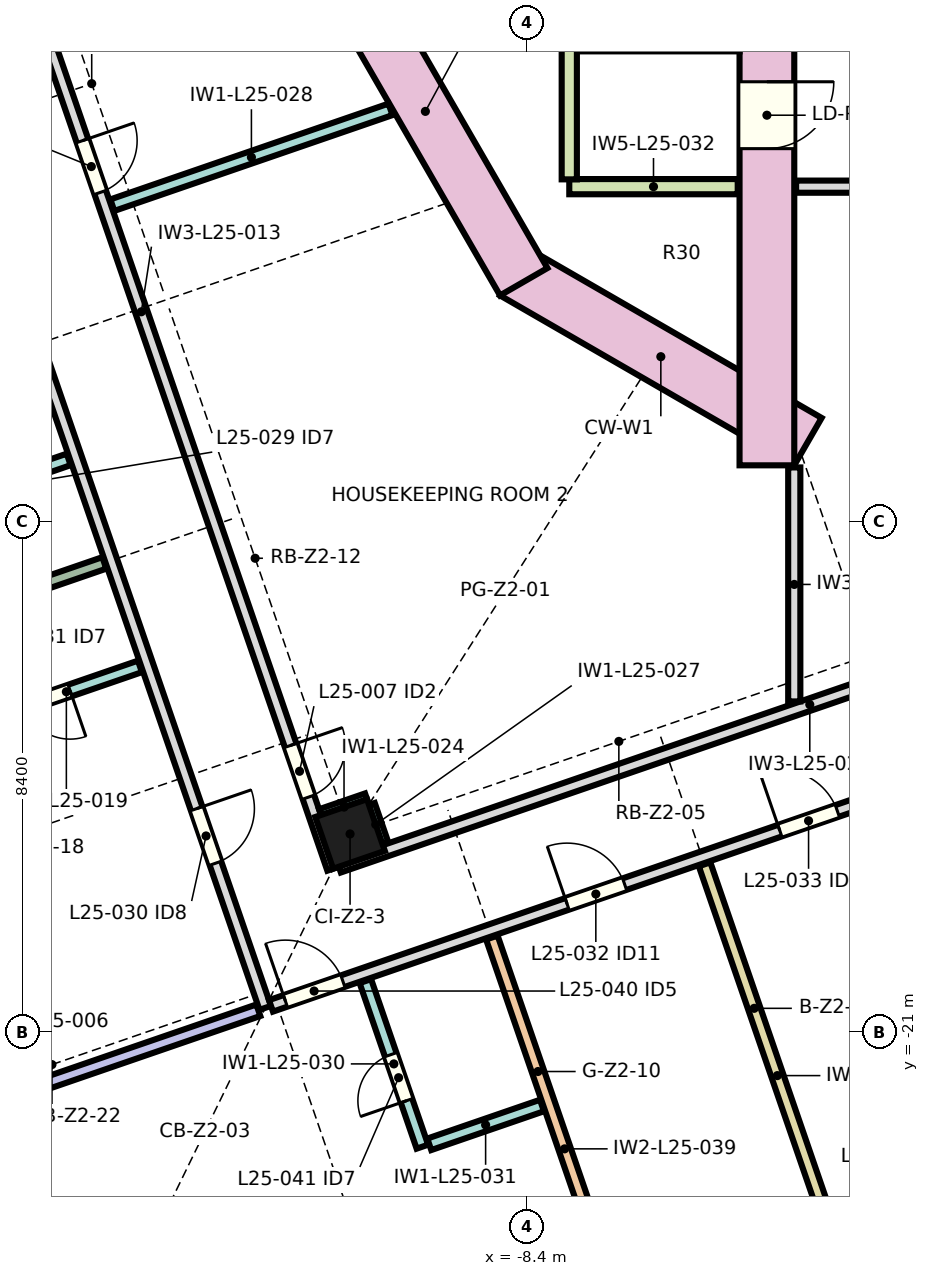
"""IFC4 building model, lengths in metres.
Left out: names, types, materials, properties, quantities, classifications, styles, units other than length and angle.
Written with IfcOpenShell. Run it as: python <this file> out.ifc"""

import sys

from ifc_helpers import new_model, si_unit, direction, frame, frame_2d, origin, origin_2d, place, context, subcontext, project, spatial, rectangle, extrude, element, fill, save


model = new_model("IFC4")
c1 = context("Model", 3, precision=1e-05, world=origin(), true_north=direction((0.0, 1.0)))
c2 = subcontext(c1, "Body", "Model", "MODEL_VIEW")
j1 = project(units=[si_unit("LENGTHUNIT", "METRE"), si_unit("PLANEANGLEUNIT", "RADIAN")], contexts=[c1])
p1 = place(None, origin())
s1 = spatial("IfcSite", under=j1, at=p1, CompositionType="ELEMENT")
p2 = place(p1, origin())
s2 = spatial("IfcBuilding", under=s1, at=p2, CompositionType="ELEMENT")
p3 = place(p2, frame((0.0, 0.0, 123.1)))
s3 = spatial("IfcBuildingStorey", under=s2, at=p3, CompositionType="ELEMENT", Elevation=123.1)
p4 = place(p3, frame((-11.305, -17.695, 0.0), z_axis=(0.0, 0.0, 1.0), x_axis=(0.945518575599, 0.325568154457, 0.0)))
e1 = element("IfcColumn", 1, at=p4, inside=s3, PredefinedType="COLUMN", context=c2, shape_type="SweptSolid", body=[
    extrude(rectangle(XDim=0.9, YDim=0.9, at=origin_2d()), origin(), (0.0, 0.0, 1.0), 3.55),
])
p5 = place(p3, frame((-3.775, -11.243, 0.0), z_axis=(0.0, 0.0, 1.0), x_axis=(-0.866026961591, 0.49999730179, 0.0)))
e2 = element("IfcWall", 2, at=p5, inside=s3, PredefinedType="SHEAR", context=c2, shape_type="SweptSolid", body=[
    extrude(rectangle(XDim=5.587, YDim=0.9, at=frame_2d((2.794, 0.0))), origin(), (0.0, 0.0, 1.0), 3.8),
])
p6 = place(p3, frame((-8.449, -8.614, 0.0), z_axis=(0.0, 0.0, 1.0), x_axis=(-0.499990282633, 0.866031014036, 0.0)))
e3 = element("IfcWall", 3, at=p6, inside=s3, PredefinedType="SHEAR", context=c2, shape_type="SweptSolid", body=[
    extrude(rectangle(XDim=6.47, YDim=0.9, at=frame_2d((3.235, 0.0))), origin(), (0.0, 0.0, 1.0), 3.8),
])
p7 = place(p3, frame((-4.45, 11.633, 0.0), z_axis=(0.0, 0.0, 1.0), x_axis=(0.0, -1.0, 0.0)))
e4 = element("IfcWall", 4, at=p7, inside=s3, PredefinedType="SHEAR", context=c2, shape_type="SweptSolid", body=[
    extrude(rectangle(XDim=23.265, YDim=0.9, at=frame_2d((11.633, 0.0))), origin(), (0.0, 0.0, 1.0), 3.8),
])
p8 = place(p7, frame((14.607, 0.0, 0.0)))
e5 = element("IfcOpeningElement", 5, at=p8, cuts=e4, PredefinedType="OPENING", context=c2, shape_type="SweptSolid", body=[
    extrude(rectangle(XDim=1.1, YDim=2.1, at=frame_2d((0.55, 1.05))), frame((0.0, 0.46, 0.0), z_axis=(0.0, -1.0, 0.0), x_axis=(1.0, 0.0, 0.0)), (0.0, 0.0, 1.0), 0.92),
])
p9 = place(p7, frame((16.958, 0.0, 0.0)))
e6 = element("IfcOpeningElement", 6, at=p9, cuts=e4, PredefinedType="OPENING", context=c2, shape_type="SweptSolid", body=[
    extrude(rectangle(XDim=1.1, YDim=2.1, at=frame_2d((0.55, 1.05))), frame((0.0, 0.46, 0.0), z_axis=(0.0, -1.0, 0.0), x_axis=(1.0, 0.0, 0.0)), (0.0, 0.0, 1.0), 0.92),
])
p10 = place(p7, frame((5.208, 0.0, 0.0)))
e7 = element("IfcOpeningElement", 7, at=p10, cuts=e4, PredefinedType="OPENING", context=c2, shape_type="SweptSolid", body=[
    extrude(rectangle(XDim=1.1, YDim=2.1, at=frame_2d((0.55, 1.05))), frame((0.0, 0.46, 0.0), z_axis=(0.0, -1.0, 0.0), x_axis=(1.0, 0.0, 0.0)), (0.0, 0.0, 1.0), 0.92),
])
p11 = place(p3, frame((-22.63, 8.284, 0.0), z_axis=(0.0, 0.0, 1.0), x_axis=(0.325570542196, -0.945517753431, 0.0)))
e8 = element("IfcWall", 8, at=p11, inside=s3, PredefinedType="PARTITIONING", context=c2, shape_type="SweptSolid", body=[
    extrude(rectangle(XDim=30.5, YDim=0.2, at=frame_2d((15.25, 0.0))), origin(), (0.0, 0.0, 1.0), 3.55),
])
p12 = place(p11, frame((5.07, 0.0, 0.0)))
e9 = element("IfcOpeningElement", 9, at=p12, cuts=e8, PredefinedType="OPENING", context=c2, shape_type="SweptSolid", body=[
    extrude(rectangle(XDim=1.2, YDim=2.1, at=frame_2d((0.6, 1.05))), frame((0.0, 0.11, 0.0), z_axis=(0.0, -1.0, 0.0), x_axis=(1.0, 0.0, 0.0)), (0.0, 0.0, 1.0), 0.22),
])
p13 = place(p11, frame((15.705, 0.0, 0.0)))
e10 = element("IfcOpeningElement", 10, at=p13, cuts=e8, PredefinedType="OPENING", context=c2, shape_type="SweptSolid", body=[
    extrude(rectangle(XDim=0.95, YDim=2.1, at=frame_2d((0.475, 1.05))), frame((0.0, 0.11, 0.0), z_axis=(0.0, -1.0, 0.0), x_axis=(1.0, 0.0, 0.0)), (0.0, 0.0, 1.0), 0.22),
])
p14 = place(p11, frame((27.035, 0.0, 0.0)))
e11 = element("IfcOpeningElement", 11, at=p14, cuts=e8, PredefinedType="OPENING", context=c2, shape_type="SweptSolid", body=[
    extrude(rectangle(XDim=0.95, YDim=2.1, at=frame_2d((0.475, 1.05))), frame((0.0, 0.11, 0.0), z_axis=(0.0, -1.0, 0.0), x_axis=(1.0, 0.0, 0.0)), (0.0, 0.0, 1.0), 0.22),
])
p15 = place(p3, frame((-19.763, -22.987, 0.0), z_axis=(0.0, 0.0, 1.0), x_axis=(0.945511269654, 0.32558937169, 0.0)))
e12 = element("IfcWall", 12, at=p15, inside=s3, PredefinedType="PARTITIONING", context=c2, shape_type="SweptSolid", body=[
    extrude(rectangle(XDim=7.35, YDim=0.2, at=frame_2d((3.675, 0.0))), origin(), (0.0, 0.0, 1.0), 3.55),
])
p16 = place(p3, frame((-18.466, -12.408, 0.0), z_axis=(0.0, 0.0, 1.0), x_axis=(0.94551230217, 0.325586373249, 0.0)))
e13 = element("IfcWall", 13, at=p16, inside=s3, PredefinedType="PARTITIONING", context=c2, shape_type="SweptSolid", body=[
    extrude(rectangle(XDim=2.68, YDim=0.2, at=frame_2d((1.34, 0.0))), origin(), (0.0, 0.0, 1.0), 3.55),
])
p17 = place(p16, frame((0.664, 0.0, 0.0)))
e14 = element("IfcOpeningElement", 14, at=p17, cuts=e13, PredefinedType="OPENING", context=c2, shape_type="SweptSolid", body=[
    extrude(rectangle(XDim=0.8, YDim=2.1, at=frame_2d((0.4, 1.05))), frame((0.0, 0.11, 0.0), z_axis=(0.0, -1.0, 0.0), x_axis=(1.0, 0.0, 0.0)), (0.0, 0.0, 1.0), 0.22),
])
p18 = place(p3, frame((-17.892, 0.051, 0.0), z_axis=(0.0, 0.0, 1.0), x_axis=(0.325580537834, -0.94551431157, 0.0)))
e15 = element("IfcWall", 15, at=p18, inside=s3, PredefinedType="PARTITIONING", context=c2, shape_type="SweptSolid", body=[
    extrude(rectangle(XDim=19.374, YDim=0.2, at=frame_2d((9.687, 0.0))), origin(), (0.0, 0.0, 1.0), 3.55),
])
p19 = place(p18, frame((6.711, 0.0, 0.0)))
e16 = element("IfcOpeningElement", 16, at=p19, cuts=e15, PredefinedType="OPENING", context=c2, shape_type="SweptSolid", body=[
    extrude(rectangle(XDim=0.9, YDim=2.1, at=frame_2d((0.45, 1.05))), frame((0.0, 0.11, 0.0), z_axis=(0.0, -1.0, 0.0), x_axis=(1.0, 0.0, 0.0)), (0.0, 0.0, 1.0), 0.22),
])
p20 = place(p18, frame((17.229, 0.0, 0.0)))
e17 = element("IfcOpeningElement", 17, at=p20, cuts=e15, PredefinedType="OPENING", context=c2, shape_type="SweptSolid", body=[
    extrude(rectangle(XDim=0.9, YDim=2.1, at=frame_2d((0.45, 1.05))), frame((0.0, 0.11, 0.0), z_axis=(0.0, -1.0, 0.0), x_axis=(1.0, 0.0, 0.0)), (0.0, 0.0, 1.0), 0.22),
])
p21 = place(p3, frame((-15.346, -13.238, 0.0), z_axis=(0.0, 0.0, 1.0), x_axis=(-0.945521494984, -0.325559675824, 0.0)))
e18 = element("IfcWall", 18, at=p21, inside=s3, PredefinedType="PARTITIONING", context=c2, shape_type="SweptSolid", body=[
    extrude(rectangle(XDim=7.35, YDim=0.2, at=frame_2d((3.675, 0.0))), origin(), (0.0, 0.0, 1.0), 3.05),
])
p22 = place(p3, frame((-14.76, -14.939, 0.0), z_axis=(0.0, 0.0, 1.0), x_axis=(-0.9455087096, -0.325596805989, 0.0)))
e19 = element("IfcWall", 19, at=p22, inside=s3, PredefinedType="PARTITIONING", context=c2, shape_type="SweptSolid", body=[
    extrude(rectangle(XDim=2.56, YDim=0.2, at=frame_2d((1.28, 0.0))), origin(), (0.0, 0.0, 1.0), 3.55),
])
p23 = place(p22, frame((1.216, 0.0, 0.0)))
e20 = element("IfcOpeningElement", 20, at=p23, cuts=e19, PredefinedType="OPENING", context=c2, shape_type="SweptSolid", body=[
    extrude(rectangle(XDim=0.8, YDim=2.1, at=frame_2d((0.4, 1.05))), frame((0.0, 0.11, 0.0), z_axis=(0.0, -1.0, 0.0), x_axis=(1.0, 0.0, 0.0)), (0.0, 0.0, 1.0), 0.22),
])
p24 = place(p3, frame((-12.605, -20.522, 0.0), z_axis=(0.0, 0.0, 1.0), x_axis=(0.945519651594, 0.325565029526, 0.0)))
e21 = element("IfcWall", 21, at=p24, inside=s3, PredefinedType="PARTITIONING", context=c2, shape_type="SweptSolid", body=[
    extrude(rectangle(XDim=37.3, YDim=0.2, at=frame_2d((18.65, 0.0))), origin(), (0.0, 0.0, 1.0), 3.55),
])
p25 = place(p24, frame((5.15, 0.0, 0.0)))
e22 = element("IfcOpeningElement", 22, at=p25, cuts=e21, PredefinedType="OPENING", context=c2, shape_type="SweptSolid", body=[
    extrude(rectangle(XDim=1.0, YDim=2.1, at=frame_2d((0.5, 1.05))), frame((0.0, 0.11, 0.0), z_axis=(0.0, -1.0, 0.0), x_axis=(1.0, 0.0, 0.0)), (0.0, 0.0, 1.0), 0.22),
])
p26 = place(p24, frame((8.85, 0.0, 0.0)))
e23 = element("IfcOpeningElement", 23, at=p26, cuts=e21, PredefinedType="OPENING", context=c2, shape_type="SweptSolid", body=[
    extrude(rectangle(XDim=1.0, YDim=2.1, at=frame_2d((0.5, 1.05))), frame((0.0, 0.11, 0.0), z_axis=(0.0, -1.0, 0.0), x_axis=(1.0, 0.0, 0.0)), (0.0, 0.0, 1.0), 0.22),
])
p27 = place(p24, frame((12.55, 0.0, 0.0)))
e24 = element("IfcOpeningElement", 24, at=p27, cuts=e21, PredefinedType="OPENING", context=c2, shape_type="SweptSolid", body=[
    extrude(rectangle(XDim=1.0, YDim=2.1, at=frame_2d((0.5, 1.05))), frame((0.0, 0.11, 0.0), z_axis=(0.0, -1.0, 0.0), x_axis=(1.0, 0.0, 0.0)), (0.0, 0.0, 1.0), 0.22),
])
p28 = place(p24, frame((21.05, 0.0, 0.0)))
e25 = element("IfcOpeningElement", 25, at=p28, cuts=e21, PredefinedType="OPENING", context=c2, shape_type="SweptSolid", body=[
    extrude(rectangle(XDim=1.0, YDim=2.1, at=frame_2d((0.5, 1.05))), frame((0.0, 0.11, 0.0), z_axis=(0.0, -1.0, 0.0), x_axis=(1.0, 0.0, 0.0)), (0.0, 0.0, 1.0), 0.22),
])
p29 = place(p24, frame((28.325, 0.0, 0.0)))
e26 = element("IfcOpeningElement", 26, at=p29, cuts=e21, PredefinedType="OPENING", context=c2, shape_type="SweptSolid", body=[
    extrude(rectangle(XDim=0.95, YDim=2.1, at=frame_2d((0.475, 1.05))), frame((0.0, 0.11, 0.0), z_axis=(0.0, -1.0, 0.0), x_axis=(1.0, 0.0, 0.0)), (0.0, 0.0, 1.0), 0.22),
])
p30 = place(p24, frame((0.25, 0.0, 0.0)))
e27 = element("IfcOpeningElement", 27, at=p30, cuts=e21, PredefinedType="OPENING", context=c2, shape_type="SweptSolid", body=[
    extrude(rectangle(XDim=1.0, YDim=2.1, at=frame_2d((0.5, 1.05))), frame((0.0, 0.11, 0.0), z_axis=(0.0, -1.0, 0.0), x_axis=(1.0, 0.0, 0.0)), (0.0, 0.0, 1.0), 0.22),
])
p31 = place(p24, frame((34.25, 0.0, 0.0)))
e28 = element("IfcOpeningElement", 28, at=p31, cuts=e21, PredefinedType="OPENING", context=c2, shape_type="SweptSolid", body=[
    extrude(rectangle(XDim=1.1, YDim=2.1, at=frame_2d((0.55, 1.05))), frame((0.0, 0.11, 0.0), z_axis=(0.0, -1.0, 0.0), x_axis=(1.0, 0.0, 0.0)), (0.0, 0.0, 1.0), 0.22),
])
p32 = place(p3, frame((-11.49, -18.234, 0.0), z_axis=(0.0, 0.0, 1.0), x_axis=(0.945522545762, 0.325556624039, 0.0)))
e29 = element("IfcWall", 29, at=p32, inside=s3, PredefinedType="PARTITIONING", context=c2, shape_type="SweptSolid", body=[
    extrude(rectangle(XDim=16.382, YDim=0.2, at=frame_2d((8.191, 0.0))), origin(), (0.0, 0.0, 1.0), 3.55),
])
p33 = place(p32, frame((11.152, 0.0, 0.0)))
e30 = element("IfcOpeningElement", 30, at=p33, cuts=e29, PredefinedType="OPENING", context=c2, shape_type="SweptSolid", body=[
    extrude(rectangle(XDim=2.0, YDim=2.1, at=frame_2d((1.0, 1.05))), frame((0.0, 0.11, 0.0), z_axis=(0.0, -1.0, 0.0), x_axis=(1.0, 0.0, 0.0)), (0.0, 0.0, 1.0), 0.22),
])
p34 = place(p3, frame((-11.026, -17.123, 0.0), z_axis=(0.0, 0.0, 1.0), x_axis=(-0.945525269499, -0.325548713312, 0.0)))
e31 = element("IfcWall", 31, at=p34, inside=s3, PredefinedType="PARTITIONING", context=c2, shape_type="SweptSolid", body=[
    extrude(rectangle(XDim=0.8, YDim=0.2, at=frame_2d((0.4, 0.0))), origin(), (0.0, 0.0, 1.0), 3.55),
])
p35 = place(p3, frame((-10.772, -17.86, 0.0), z_axis=(0.0, 0.0, 1.0), x_axis=(-0.325691873105, 0.945475966798, 0.0)))
e32 = element("IfcWall", 32, at=p35, inside=s3, PredefinedType="PARTITIONING", context=c2, shape_type="SweptSolid", body=[
    extrude(rectangle(XDim=0.68, YDim=0.2, at=frame_2d((0.34, 0.0))), origin(), (0.0, 0.0, 1.0), 3.55),
])
p36 = place(p3, frame((-10.64, -5.779, 0.0), z_axis=(0.0, 0.0, 1.0), x_axis=(-0.945513394783, -0.325583200253, 0.0)))
e33 = element("IfcWall", 33, at=p36, inside=s3, PredefinedType="PARTITIONING", context=c2, shape_type="SweptSolid", body=[
    extrude(rectangle(XDim=4.838, YDim=0.2, at=frame_2d((2.419, 0.0))), origin(), (0.0, 0.0, 1.0), 3.55),
])
p37 = place(p3, frame((-10.116, -22.838, 0.0), z_axis=(0.0, 0.0, 1.0), x_axis=(-0.325596179186, 0.945508925447, 0.0)))
e34 = element("IfcWall", 34, at=p37, inside=s3, PredefinedType="PARTITIONING", context=c2, shape_type="SweptSolid", body=[
    extrude(rectangle(XDim=2.88, YDim=0.2, at=frame_2d((1.44, 0.0))), origin(), (0.0, 0.0, 1.0), 3.55),
])
p38 = place(p37, frame((0.8, 0.0, 0.0)))
e35 = element("IfcOpeningElement", 35, at=p38, cuts=e34, PredefinedType="OPENING", context=c2, shape_type="SweptSolid", body=[
    extrude(rectangle(XDim=0.8, YDim=2.1, at=frame_2d((0.4, 1.05))), frame((0.0, 0.11, 0.0), z_axis=(0.0, -1.0, 0.0), x_axis=(1.0, 0.0, 0.0)), (0.0, 0.0, 1.0), 0.22),
])
p39 = place(p3, frame((-8.149, -22.16, 0.0), z_axis=(0.0, 0.0, 1.0), x_axis=(-0.945510558394, -0.325591437181, 0.0)))
e36 = element("IfcWall", 36, at=p39, inside=s3, PredefinedType="PARTITIONING", context=c2, shape_type="SweptSolid", body=[
    extrude(rectangle(XDim=1.96, YDim=0.2, at=frame_2d((0.98, 0.0))), origin(), (0.0, 0.0, 1.0), 3.55),
])
p40 = place(p3, frame((-7.7, -7.05, 0.0), z_axis=(0.0, 0.0, 1.0), x_axis=(1.0, 0.0, 0.0)))
e37 = element("IfcWall", 37, at=p40, inside=s3, PredefinedType="SOLIDWALL", context=c2, shape_type="SweptSolid", body=[
    extrude(rectangle(XDim=2.77, YDim=0.25, at=frame_2d((1.385, 0.0))), origin(), (0.0, 0.0, 1.0), 3.55),
])
p41 = place(p3, frame((-7.7, 7.05, 0.0), z_axis=(0.0, 0.0, 1.0), x_axis=(0.0, -1.0, 0.0)))
e38 = element("IfcWall", 38, at=p41, inside=s3, PredefinedType="SOLIDWALL", context=c2, shape_type="SweptSolid", body=[
    extrude(rectangle(XDim=13.98, YDim=0.25, at=frame_2d((6.99, 0.0))), origin(), (0.0, 0.0, 1.0), 3.55),
])
p42 = place(p3, frame((-6.581, -26.348, 0.0), z_axis=(0.0, 0.0, 1.0), x_axis=(-0.325549451152, 0.945525015457, 0.0)))
e39 = element("IfcWall", 39, at=p42, inside=s3, PredefinedType="PARTITIONING", context=c2, shape_type="SweptSolid", body=[
    extrude(rectangle(XDim=7.35, YDim=0.2, at=frame_2d((3.675, 0.0))), origin(), (0.0, 0.0, 1.0), 2.65),
])
p43 = place(p3, frame((-5.475, -18.194, 0.0), z_axis=(0.0, 0.0, 1.0), x_axis=(0.325579146306, -0.945514790731, 0.0)))
e40 = element("IfcWall", 40, at=p43, inside=s3, PredefinedType="PARTITIONING", context=c2, shape_type="SweptSolid", body=[
    extrude(rectangle(XDim=7.35, YDim=0.2, at=frame_2d((3.675, 0.0))), origin(), (0.0, 0.0, 1.0), 3.05),
])
p44 = place(p3, frame((-4.0, -11.667, 0.0), z_axis=(0.0, 0.0, 1.0), x_axis=(0.0, -1.0, 0.0)))
e41 = element("IfcWall", 41, at=p44, inside=s3, PredefinedType="PARTITIONING", context=c2, shape_type="SweptSolid", body=[
    extrude(rectangle(XDim=3.848, YDim=0.2, at=frame_2d((1.924, 0.0))), origin(), (0.0, 0.0, 1.0), 3.55),
])
p45 = place(p3, frame((3.97, -7.05, 0.0), z_axis=(0.0, 0.0, 1.0), x_axis=(-1.0, 0.0, 0.0)))
e42 = element("IfcWall", 42, at=p45, inside=s3, PredefinedType="PARTITIONING", context=c2, shape_type="SweptSolid", body=[
    extrude(rectangle(XDim=7.94, YDim=0.2, at=frame_2d((3.97, 0.0))), origin(), (0.0, 0.0, 1.0), 3.55),
])
p46 = place(p45, frame((2.97, 0.0, 0.0)))
e43 = element("IfcOpeningElement", 43, at=p46, cuts=e42, PredefinedType="OPENING", context=c2, shape_type="SweptSolid", body=[
    extrude(rectangle(XDim=2.0, YDim=2.1, at=frame_2d((1.0, 1.05))), frame((0.0, 0.11, 0.0), z_axis=(0.0, -1.0, 0.0), x_axis=(1.0, 0.0, 0.0)), (0.0, 0.0, 1.0), 0.22),
])
p47 = place(p19, origin())
e44 = element("IfcDoor", 44, at=p47, inside=s3, OperationType="NOTDEFINED", PredefinedType="DOOR", context=c2, shape_type="SweptSolid", body=[
    extrude(rectangle(XDim=0.9, YDim=2.1, at=frame_2d((0.45, 1.05))), frame((0.0, 0.025, 0.0), z_axis=(0.0, -1.0, 0.0), x_axis=(1.0, 0.0, 0.0)), (0.0, 0.0, 1.0), 0.05),
])
fill(e16, e44)
p48 = place(p20, origin())
e45 = element("IfcDoor", 45, at=p48, inside=s3, OperationType="NOTDEFINED", PredefinedType="DOOR", context=c2, shape_type="SweptSolid", body=[
    extrude(rectangle(XDim=0.9, YDim=2.1, at=frame_2d((0.45, 1.05))), frame((0.0, 0.025, 0.0), z_axis=(0.0, -1.0, 0.0), x_axis=(1.0, 0.0, 0.0)), (0.0, 0.0, 1.0), 0.05),
])
fill(e17, e45)
p49 = place(p14, origin())
e46 = element("IfcDoor", 46, at=p49, inside=s3, OperationType="NOTDEFINED", PredefinedType="DOOR", context=c2, shape_type="SweptSolid", body=[
    extrude(rectangle(XDim=0.95, YDim=2.1, at=frame_2d((0.475, 1.05))), frame((0.0, 0.025, 0.0), z_axis=(0.0, -1.0, 0.0), x_axis=(1.0, 0.0, 0.0)), (0.0, 0.0, 1.0), 0.05),
])
fill(e11, e46)
p50 = place(p23, origin())
e47 = element("IfcDoor", 47, at=p50, inside=s3, OperationType="NOTDEFINED", PredefinedType="DOOR", context=c2, shape_type="SweptSolid", body=[
    extrude(rectangle(XDim=0.8, YDim=2.1, at=frame_2d((0.4, 1.05))), frame((0.0, 0.025, 0.0), z_axis=(0.0, -1.0, 0.0), x_axis=(1.0, 0.0, 0.0)), (0.0, 0.0, 1.0), 0.05),
])
fill(e20, e47)
p51 = place(p25, origin())
e48 = element("IfcDoor", 48, at=p51, inside=s3, OperationType="NOTDEFINED", PredefinedType="DOOR", context=c2, shape_type="SweptSolid", body=[
    extrude(rectangle(XDim=1.0, YDim=2.1, at=frame_2d((0.5, 1.05))), frame((0.0, 0.025, 0.0), z_axis=(0.0, -1.0, 0.0), x_axis=(1.0, 0.0, 0.0)), (0.0, 0.0, 1.0), 0.05),
])
fill(e22, e48)
p52 = place(p26, origin())
e49 = element("IfcDoor", 49, at=p52, inside=s3, OperationType="NOTDEFINED", PredefinedType="DOOR", context=c2, shape_type="SweptSolid", body=[
    extrude(rectangle(XDim=1.0, YDim=2.1, at=frame_2d((0.5, 1.05))), frame((0.0, 0.025, 0.0), z_axis=(0.0, -1.0, 0.0), x_axis=(1.0, 0.0, 0.0)), (0.0, 0.0, 1.0), 0.05),
])
fill(e23, e49)
p53 = place(p30, origin())
e50 = element("IfcDoor", 50, at=p53, inside=s3, OperationType="NOTDEFINED", PredefinedType="DOOR", context=c2, shape_type="SweptSolid", body=[
    extrude(rectangle(XDim=1.0, YDim=2.1, at=frame_2d((0.5, 1.05))), frame((0.0, 0.025, 0.0), z_axis=(0.0, -1.0, 0.0), x_axis=(1.0, 0.0, 0.0)), (0.0, 0.0, 1.0), 0.05),
])
fill(e27, e50)
p54 = place(p38, origin())
e51 = element("IfcDoor", 51, at=p54, inside=s3, OperationType="NOTDEFINED", PredefinedType="DOOR", context=c2, shape_type="SweptSolid", body=[
    extrude(rectangle(XDim=0.8, YDim=2.1, at=frame_2d((0.4, 1.05))), frame((0.0, 0.025, 0.0), z_axis=(0.0, -1.0, 0.0), x_axis=(1.0, 0.0, 0.0)), (0.0, 0.0, 1.0), 0.05),
])
fill(e35, e51)
p55 = place(p9, origin())
e52 = element("IfcDoor", 52, at=p55, inside=s3, OperationType="SLIDING_TO_LEFT", PredefinedType="DOOR", context=c2, shape_type="SweptSolid", body=[
    extrude(rectangle(XDim=1.1, YDim=2.1, at=frame_2d((0.55, 1.05))), frame((0.0, 0.025, 0.0), z_axis=(0.0, -1.0, 0.0), x_axis=(1.0, 0.0, 0.0)), (0.0, 0.0, 1.0), 0.05),
])
fill(e6, e52)
save(model, sys.argv[1])
